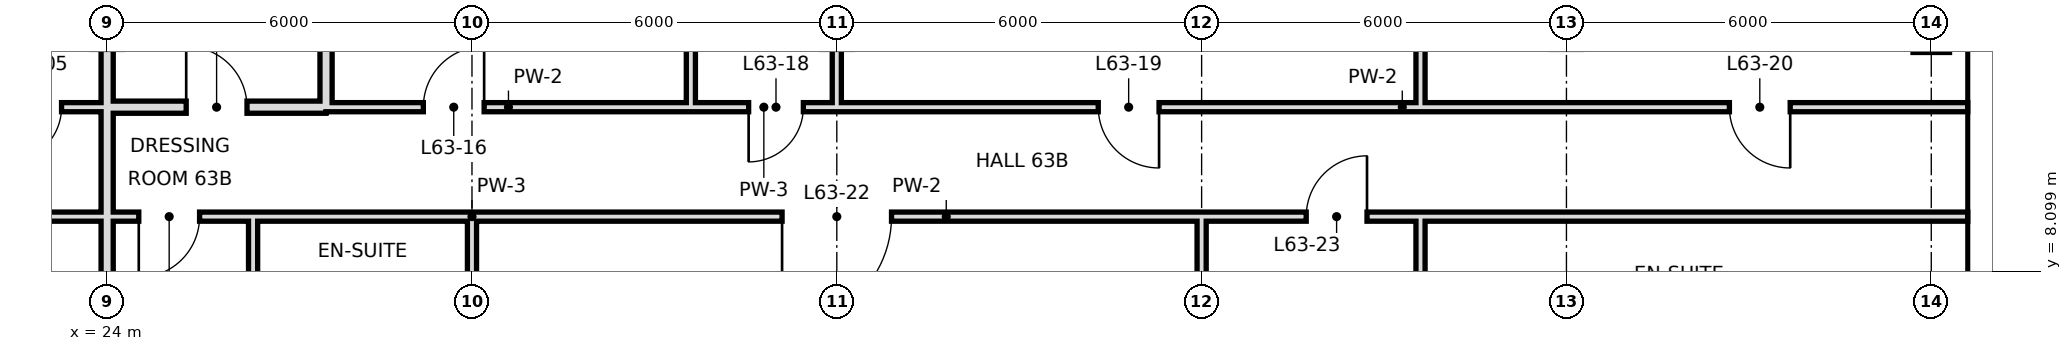
"""IFC4 building model, lengths in metres.
Left out: names, types, materials, properties, quantities, classifications, styles, units other than length and angle.
Written with IfcOpenShell. Run it as: python <this file> out.ifc"""

import sys

from ifc_helpers import new_model, si_unit, direction, frame, frame_2d, origin, place, context, subcontext, project, spatial, rectangle, extrude, element, fill, save


model = new_model("IFC4")
c1 = context("Model", 3, precision=1e-05, world=origin(), true_north=direction((0.0, 1.0)))
c2 = subcontext(c1, "Body", "Model", "MODEL_VIEW")
j1 = project(units=[si_unit("LENGTHUNIT", "METRE"), si_unit("PLANEANGLEUNIT", "RADIAN")], contexts=[c1])
p1 = place(None, origin())
s1 = spatial("IfcSite", under=j1, at=p1, CompositionType="ELEMENT")
p2 = place(p1, origin())
s2 = spatial("IfcBuilding", under=s1, at=p2, CompositionType="ELEMENT")
p3 = place(p2, frame((0.0, 0.0, 266.6)))
s3 = spatial("IfcBuildingStorey", under=s2, at=p3, CompositionType="ELEMENT", Elevation=266.6)
p4 = place(p3, frame((24.0, 10.8, 0.0), z_axis=(0.0, 0.0, 1.0), x_axis=(0.0, 1.0, 0.0)))
e1 = element("IfcWall", 1, at=p4, inside=s3, PredefinedType="SOLIDWALL", context=c2, shape_type="SweptSolid", body=[
    extrude(rectangle(XDim=7.9, YDim=0.2, at=frame_2d((3.95, 0.0))), origin(), (0.0, 0.0, 1.0), 2.72),
])
p5 = place(p3, frame((24.0, 0.0, 0.0), z_axis=(0.0, 0.0, 1.0), x_axis=(0.0, 1.0, 0.0)))
e2 = element("IfcWall", 2, at=p5, inside=s3, PredefinedType="SOLIDWALL", context=c2, shape_type="SweptSolid", body=[
    extrude(rectangle(XDim=10.8, YDim=0.2, at=frame_2d((5.4, 0.0))), origin(), (0.0, 0.0, 1.0), 2.72),
])
p6 = place(p3, frame((26.4, 6.0, 0.0), z_axis=(0.0, 0.0, 1.0), x_axis=(0.0, 1.0, 0.0)))
e3 = element("IfcWall", 3, at=p6, inside=s3, PredefinedType="PARTITIONING", context=c2, shape_type="SweptSolid", body=[
    extrude(rectangle(XDim=3.0, YDim=0.15, at=frame_2d((1.5, 0.0))), origin(), (0.0, 0.0, 1.0), 3.42),
])
p7 = place(p3, frame((27.6, 10.8, 0.0), z_axis=(0.0, 0.0, 1.0), x_axis=(0.0, 1.0, 0.0)))
e4 = element("IfcWall", 4, at=p7, inside=s3, PredefinedType="SOLIDWALL", context=c2, shape_type="SweptSolid", body=[
    extrude(rectangle(XDim=7.9, YDim=0.2, at=frame_2d((3.95, 0.0))), origin(), (0.0, 0.0, 1.0), 2.72),
])
p8 = place(p3, frame((30.0, 6.0, 0.0), z_axis=(0.0, 0.0, 1.0), x_axis=(0.0, 1.0, 0.0)))
e5 = element("IfcWall", 5, at=p8, inside=s3, PredefinedType="PARTITIONING", context=c2, shape_type="SweptSolid", body=[
    extrude(rectangle(XDim=3.0, YDim=0.15, at=frame_2d((1.5, 0.0))), origin(), (0.0, 0.0, 1.0), 2.72),
])
p9 = place(p3, frame((33.6, 10.8, 0.0), z_axis=(0.0, 0.0, 1.0), x_axis=(0.0, 1.0, 0.0)))
e6 = element("IfcWall", 6, at=p9, inside=s3, PredefinedType="PARTITIONING", context=c2, shape_type="SweptSolid", body=[
    extrude(rectangle(XDim=7.9, YDim=0.15, at=frame_2d((3.95, 0.0))), origin(), (0.0, 0.0, 1.0), 3.42),
])
p10 = place(p3, frame((36.0, 10.8, 0.0), z_axis=(0.0, 0.0, 1.0), x_axis=(0.0, 1.0, 0.0)))
e7 = element("IfcWall", 7, at=p10, inside=s3, PredefinedType="PARTITIONING", context=c2, shape_type="SweptSolid", body=[
    extrude(rectangle(XDim=7.9, YDim=0.15, at=frame_2d((3.95, 0.0))), origin(), (0.0, 0.0, 1.0), 2.72),
])
p11 = place(p3, frame((42.0, -0.6, 0.0), z_axis=(0.0, 0.0, 1.0), x_axis=(0.0, 1.0, 0.0)))
e8 = element("IfcWall", 8, at=p11, inside=s3, PredefinedType="PARTITIONING", context=c2, shape_type="SweptSolid", body=[
    extrude(rectangle(XDim=9.6, YDim=0.15, at=frame_2d((4.8, 0.0))), origin(), (0.0, 0.0, 1.0), 2.72),
])
p12 = place(p3, frame((45.6, 10.8, 0.0), z_axis=(0.0, 0.0, 1.0), x_axis=(0.0, 1.0, 0.0)))
e9 = element("IfcWall", 9, at=p12, inside=s3, PredefinedType="PARTITIONING", context=c2, shape_type="SweptSolid", body=[
    extrude(rectangle(XDim=7.2, YDim=0.15, at=frame_2d((3.6, 0.0))), origin(), (0.0, 0.0, 1.0), 3.42),
])
p13 = place(p3, frame((45.6, 6.0, 0.0), z_axis=(0.0, 0.0, 1.0), x_axis=(0.0, 1.0, 0.0)))
e10 = element("IfcWall", 10, at=p13, inside=s3, PredefinedType="PARTITIONING", context=c2, shape_type="SweptSolid", body=[
    extrude(rectangle(XDim=3.0, YDim=0.15, at=frame_2d((1.5, 0.0))), origin(), (0.0, 0.0, 1.0), 3.42),
])
p14 = place(p3, frame((24.0, 10.8, 0.0), z_axis=(0.0, 0.0, 1.0), x_axis=(1.0, 0.0, 0.0)))
e11 = element("IfcWall", 11, at=p14, inside=s3, PredefinedType="SOLIDWALL", context=c2, shape_type="SweptSolid", body=[
    extrude(rectangle(XDim=3.6, YDim=0.2, at=frame_2d((1.8, 0.0))), origin(), (0.0, 0.0, 1.0), 2.72),
])
p15 = place(p14, frame((1.3, 0.0, 0.0)))
e12 = element("IfcOpeningElement", 12, at=p15, cuts=e11, PredefinedType="OPENING", context=c2, shape_type="SweptSolid", body=[
    extrude(rectangle(XDim=1.0, YDim=2.4, at=frame_2d((0.5, 1.2))), frame((0.0, 0.11, 0.0), z_axis=(0.0, -1.0, 0.0), x_axis=(1.0, 0.0, 0.0)), (0.0, 0.0, 1.0), 0.22),
])
p16 = place(p3, frame((27.6, 10.8, 0.0), z_axis=(0.0, 0.0, 1.0), x_axis=(1.0, 0.0, 0.0)))
e13 = element("IfcWall", 13, at=p16, inside=s3, PredefinedType="PARTITIONING", context=c2, shape_type="SweptSolid", body=[
    extrude(rectangle(XDim=6.0, YDim=0.15, at=frame_2d((3.0, 0.0))), origin(), (0.0, 0.0, 1.0), 3.42),
])
p17 = place(p16, frame((1.6, 0.0, 0.0)))
e14 = element("IfcOpeningElement", 14, at=p17, cuts=e13, PredefinedType="OPENING", context=c2, shape_type="SweptSolid", body=[
    extrude(rectangle(XDim=1.0, YDim=2.4, at=frame_2d((0.5, 1.2))), frame((0.0, 0.085, 0.0), z_axis=(0.0, -1.0, 0.0), x_axis=(1.0, 0.0, 0.0)), (0.0, 0.0, 1.0), 0.17),
])
p18 = place(p3, frame((36.0, 10.8, 0.0), z_axis=(0.0, 0.0, 1.0), x_axis=(1.0, 0.0, 0.0)))
e15 = element("IfcWall", 15, at=p18, inside=s3, PredefinedType="PARTITIONING", context=c2, shape_type="SweptSolid", body=[
    extrude(rectangle(XDim=18.6, YDim=0.15, at=frame_2d((9.3, 0.0))), origin(), (0.0, 0.0, 1.0), 3.42),
])
p19 = place(p18, frame((4.3, 0.0, 0.0)))
e16 = element("IfcOpeningElement", 16, at=p19, cuts=e15, PredefinedType="OPENING", context=c2, shape_type="SweptSolid", body=[
    extrude(rectangle(XDim=1.0, YDim=2.4, at=frame_2d((0.5, 1.2))), frame((0.0, 0.085, 0.0), z_axis=(0.0, -1.0, 0.0), x_axis=(1.0, 0.0, 0.0)), (0.0, 0.0, 1.0), 0.17),
])
p20 = place(p18, frame((14.68, 0.0, 0.0)))
e17 = element("IfcOpeningElement", 17, at=p20, cuts=e15, PredefinedType="OPENING", context=c2, shape_type="SweptSolid", body=[
    extrude(rectangle(XDim=1.0, YDim=2.4, at=frame_2d((0.5, 1.2))), frame((0.0, 0.085, 0.0), z_axis=(0.0, -1.0, 0.0), x_axis=(1.0, 0.0, 0.0)), (0.0, 0.0, 1.0), 0.17),
])
p21 = place(p3, frame((21.6, 10.8, 0.0), z_axis=(0.0, 0.0, 1.0), x_axis=(1.0, 0.0, 0.0)))
e18 = element("IfcWall", 18, at=p21, inside=s3, PredefinedType="PARTITIONING", context=c2, shape_type="SweptSolid", body=[
    extrude(rectangle(XDim=2.4, YDim=0.15, at=frame_2d((1.2, 0.0))), origin(), (0.0, 0.0, 1.0), 3.42),
])
p22 = place(p21, frame((0.75, 0.0, 0.0)))
e19 = element("IfcOpeningElement", 19, at=p22, cuts=e18, PredefinedType="OPENING", context=c2, shape_type="SweptSolid", body=[
    extrude(rectangle(XDim=0.9, YDim=2.4, at=frame_2d((0.45, 1.2))), frame((0.0, 0.085, 0.0), z_axis=(0.0, -1.0, 0.0), x_axis=(1.0, 0.0, 0.0)), (0.0, 0.0, 1.0), 0.17),
])
p23 = place(p3, frame((33.6, 10.8, 0.0), z_axis=(0.0, 0.0, 1.0), x_axis=(1.0, 0.0, 0.0)))
e20 = element("IfcWall", 20, at=p23, inside=s3, PredefinedType="PARTITIONING", context=c2, shape_type="SweptSolid", body=[
    extrude(rectangle(XDim=2.4, YDim=0.15, at=frame_2d((1.2, 0.0))), origin(), (0.0, 0.0, 1.0), 3.42),
])
p24 = place(p23, frame((0.95, 0.0, 0.0)))
e21 = element("IfcOpeningElement", 21, at=p24, cuts=e20, PredefinedType="OPENING", context=c2, shape_type="SweptSolid", body=[
    extrude(rectangle(XDim=0.9, YDim=2.4, at=frame_2d((0.45, 1.2))), frame((0.0, 0.085, 0.0), z_axis=(0.0, -1.0, 0.0), x_axis=(1.0, 0.0, 0.0)), (0.0, 0.0, 1.0), 0.17),
])
p25 = place(p3, frame((24.0, 9.0, 0.0), z_axis=(0.0, 0.0, 1.0), x_axis=(1.0, 0.0, 0.0)))
e22 = element("IfcWall", 22, at=p25, inside=s3, PredefinedType="PARTITIONING", context=c2, shape_type="SweptSolid", body=[
    extrude(rectangle(XDim=2.4, YDim=0.15, at=frame_2d((1.2, 0.0))), origin(), (0.0, 0.0, 1.0), 3.42),
])
p26 = place(p25, frame((0.52, 0.0, 0.0)))
e23 = element("IfcOpeningElement", 23, at=p26, cuts=e22, PredefinedType="OPENING", context=c2, shape_type="SweptSolid", body=[
    extrude(rectangle(XDim=1.0, YDim=2.4, at=frame_2d((0.5, 1.2))), frame((0.0, 0.085, 0.0), z_axis=(0.0, -1.0, 0.0), x_axis=(1.0, 0.0, 0.0)), (0.0, 0.0, 1.0), 0.17),
])
p27 = place(p3, frame((30.0, 9.0, 0.0), z_axis=(0.0, 0.0, 1.0), x_axis=(1.0, 0.0, 0.0)))
e24 = element("IfcWall", 24, at=p27, inside=s3, PredefinedType="PARTITIONING", context=c2, shape_type="SweptSolid", body=[
    extrude(rectangle(XDim=15.6, YDim=0.15, at=frame_2d((7.8, 0.0))), origin(), (0.0, 0.0, 1.0), 3.42),
])
p28 = place(p27, frame((5.1, 0.0, 0.0)))
e25 = element("IfcOpeningElement", 25, at=p28, cuts=e24, PredefinedType="OPENING", context=c2, shape_type="SweptSolid", body=[
    extrude(rectangle(XDim=1.8, YDim=2.4, at=frame_2d((0.9, 1.2))), frame((0.0, 0.085, 0.0), z_axis=(0.0, -1.0, 0.0), x_axis=(1.0, 0.0, 0.0)), (0.0, 0.0, 1.0), 0.17),
])
p29 = place(p27, frame((13.72, 0.0, 0.0)))
e26 = element("IfcOpeningElement", 26, at=p29, cuts=e24, PredefinedType="OPENING", context=c2, shape_type="SweptSolid", body=[
    extrude(rectangle(XDim=1.0, YDim=2.4, at=frame_2d((0.5, 1.2))), frame((0.0, 0.085, 0.0), z_axis=(0.0, -1.0, 0.0), x_axis=(1.0, 0.0, 0.0)), (0.0, 0.0, 1.0), 0.17),
])
p30 = place(p3, frame((21.6, 9.0, 0.0), z_axis=(0.0, 0.0, 1.0), x_axis=(1.0, 0.0, 0.0)))
e27 = element("IfcWall", 27, at=p30, inside=s3, PredefinedType="PARTITIONING", context=c2, shape_type="SweptSolid", body=[
    extrude(rectangle(XDim=2.4, YDim=0.15, at=frame_2d((1.2, 0.0))), origin(), (0.0, 0.0, 1.0), 3.42),
])
p31 = place(p3, frame((26.4, 9.0, 0.0), z_axis=(0.0, 0.0, 1.0), x_axis=(1.0, 0.0, 0.0)))
e28 = element("IfcWall", 28, at=p31, inside=s3, PredefinedType="PARTITIONING", context=c2, shape_type="SweptSolid", body=[
    extrude(rectangle(XDim=3.6, YDim=0.15, at=frame_2d((1.8, 0.0))), origin(), (0.0, 0.0, 1.0), 3.42),
])
p32 = place(p3, frame((45.6, 9.0, 0.0), z_axis=(0.0, 0.0, 1.0), x_axis=(1.0, 0.0, 0.0)))
e29 = element("IfcWall", 29, at=p32, inside=s3, PredefinedType="PARTITIONING", context=c2, shape_type="SweptSolid", body=[
    extrude(rectangle(XDim=9.0, YDim=0.15, at=frame_2d((4.5, 0.0))), origin(), (0.0, 0.0, 1.0), 3.42),
])
p33 = place(p22, frame((0.9, 0.0, 0.0), z_axis=(0.0, 0.0, 1.0), x_axis=(-1.0, 0.0, 0.0)))
e30 = element("IfcDoor", 30, at=p33, inside=s3, OperationType="SINGLE_SWING_RIGHT", PredefinedType="DOOR", context=c2, shape_type="SweptSolid", body=[
    extrude(rectangle(XDim=0.9, YDim=2.4, at=frame_2d((0.45, 1.2))), frame((0.0, 0.025, 0.0), z_axis=(0.0, -1.0, 0.0), x_axis=(1.0, 0.0, 0.0)), (0.0, 0.0, 1.0), 0.05),
])
fill(e19, e30)
p34 = place(p17, frame((1.0, 0.0, 0.0), z_axis=(0.0, 0.0, 1.0), x_axis=(-1.0, 0.0, 0.0)))
e31 = element("IfcDoor", 31, at=p34, inside=s3, OperationType="SINGLE_SWING_LEFT", PredefinedType="DOOR", context=c2, shape_type="SweptSolid", body=[
    extrude(rectangle(XDim=1.0, YDim=2.4, at=frame_2d((0.5, 1.2))), frame((0.0, 0.025, 0.0), z_axis=(0.0, -1.0, 0.0), x_axis=(1.0, 0.0, 0.0)), (0.0, 0.0, 1.0), 0.05),
])
fill(e14, e31)
p35 = place(p15, origin())
e32 = element("IfcDoor", 32, at=p35, inside=s3, OperationType="SINGLE_SWING_LEFT", PredefinedType="DOOR", context=c2, shape_type="SweptSolid", body=[
    extrude(rectangle(XDim=1.0, YDim=2.4, at=frame_2d((0.5, 1.2))), frame((0.0, 0.025, 0.0), z_axis=(0.0, -1.0, 0.0), x_axis=(1.0, 0.0, 0.0)), (0.0, 0.0, 1.0), 0.05),
])
fill(e12, e32)
p36 = place(p24, frame((0.9, 0.0, 0.0), z_axis=(0.0, 0.0, 1.0), x_axis=(-1.0, 0.0, 0.0)))
e33 = element("IfcDoor", 33, at=p36, inside=s3, OperationType="SINGLE_SWING_RIGHT", PredefinedType="DOOR", context=c2, shape_type="SweptSolid", body=[
    extrude(rectangle(XDim=0.9, YDim=2.4, at=frame_2d((0.45, 1.2))), frame((0.0, 0.025, 0.0), z_axis=(0.0, -1.0, 0.0), x_axis=(1.0, 0.0, 0.0)), (0.0, 0.0, 1.0), 0.05),
])
fill(e21, e33)
p37 = place(p19, origin())
e34 = element("IfcDoor", 34, at=p37, inside=s3, OperationType="SINGLE_SWING_RIGHT", PredefinedType="DOOR", context=c2, shape_type="SweptSolid", body=[
    extrude(rectangle(XDim=1.0, YDim=2.4, at=frame_2d((0.5, 1.2))), frame((0.0, 0.025, 0.0), z_axis=(0.0, -1.0, 0.0), x_axis=(1.0, 0.0, 0.0)), (0.0, 0.0, 1.0), 0.05),
])
fill(e16, e34)
p38 = place(p20, origin())
e35 = element("IfcDoor", 35, at=p38, inside=s3, OperationType="SINGLE_SWING_RIGHT", PredefinedType="DOOR", context=c2, shape_type="SweptSolid", body=[
    extrude(rectangle(XDim=1.0, YDim=2.4, at=frame_2d((0.5, 1.2))), frame((0.0, 0.025, 0.0), z_axis=(0.0, -1.0, 0.0), x_axis=(1.0, 0.0, 0.0)), (0.0, 0.0, 1.0), 0.05),
])
fill(e17, e35)
p39 = place(p26, frame((1.0, 0.0, 0.0), z_axis=(0.0, 0.0, 1.0), x_axis=(-1.0, 0.0, 0.0)))
e36 = element("IfcDoor", 36, at=p39, inside=s3, OperationType="SINGLE_SWING_RIGHT", PredefinedType="DOOR", context=c2, shape_type="SweptSolid", body=[
    extrude(rectangle(XDim=1.0, YDim=2.4, at=frame_2d((0.5, 1.2))), frame((0.0, 0.025, 0.0), z_axis=(0.0, -1.0, 0.0), x_axis=(1.0, 0.0, 0.0)), (0.0, 0.0, 1.0), 0.05),
])
fill(e23, e36)
p40 = place(p28, frame((1.8, 0.0, 0.0), z_axis=(0.0, 0.0, 1.0), x_axis=(-1.0, 0.0, 0.0)))
e37 = element("IfcDoor", 37, at=p40, inside=s3, OperationType="SINGLE_SWING_RIGHT", PredefinedType="DOOR", context=c2, shape_type="SweptSolid", body=[
    extrude(rectangle(XDim=1.8, YDim=2.4, at=frame_2d((0.9, 1.2))), frame((0.0, 0.025, 0.0), z_axis=(0.0, -1.0, 0.0), x_axis=(1.0, 0.0, 0.0)), (0.0, 0.0, 1.0), 0.05),
])
fill(e25, e37)
p41 = place(p29, frame((1.0, 0.0, 0.0), z_axis=(0.0, 0.0, 1.0), x_axis=(-1.0, 0.0, 0.0)))
e38 = element("IfcDoor", 38, at=p41, inside=s3, OperationType="SINGLE_SWING_LEFT", PredefinedType="DOOR", context=c2, shape_type="SweptSolid", body=[
    extrude(rectangle(XDim=1.0, YDim=2.4, at=frame_2d((0.5, 1.2))), frame((0.0, 0.025, 0.0), z_axis=(0.0, -1.0, 0.0), x_axis=(1.0, 0.0, 0.0)), (0.0, 0.0, 1.0), 0.05),
])
fill(e26, e38)
save(model, sys.argv[1])
